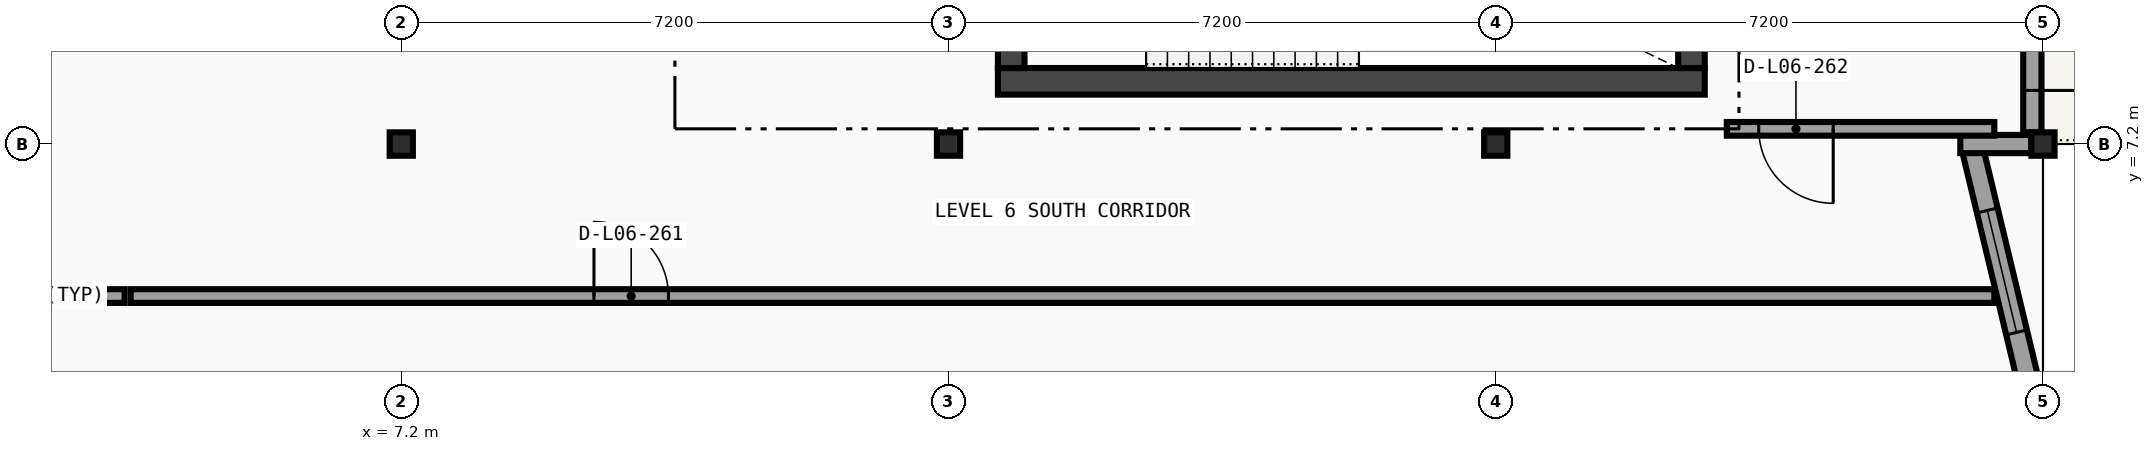
"""IFC4 building model, lengths in metres.
Left out: names, types, materials, properties, quantities, classifications, styles, units other than length and angle.
Written with IfcOpenShell. Run it as: python <this file> out.ifc"""

import sys

from ifc_helpers import new_model, si_unit, direction, frame, frame_2d, origin, origin_2d, place, context, subcontext, project, spatial, rectangle, i_section, extrude, element, fill, save


model = new_model("IFC4")
c1 = context("Model", 3, precision=1e-05, world=origin(), true_north=direction((0.0, 1.0)))
c2 = subcontext(c1, "Body", "Model", "MODEL_VIEW")
j1 = project(units=[si_unit("LENGTHUNIT", "METRE"), si_unit("PLANEANGLEUNIT", "RADIAN")], contexts=[c1])
p1 = place(None, origin())
s1 = spatial("IfcSite", under=j1, at=p1, CompositionType="ELEMENT")
p2 = place(p1, origin())
s2 = spatial("IfcBuilding", under=s1, at=p2, CompositionType="ELEMENT")
p3 = place(p2, frame((0.0, 0.0, 27.0)))
s3 = spatial("IfcBuildingStorey", under=s2, at=p3, CompositionType="ELEMENT", Elevation=27.0)
for number, where, z_axis, x_axis in (
    (1, (7.2, 7.2, 0.0), (0.0, 0.0, 1.0), (1.0, 0.0, 0.0)),
    (2, (14.4, 7.2, 0.0), (0.0, 0.0, 1.0), (1.0, 0.0, 0.0)),
    (3, (21.6, 7.2, 0.0), (0.0, 0.0, 1.0), (1.0, 0.0, 0.0)),
    (4, (28.8, 7.2, 0.0), (0.0, 0.0, 1.0), (1.0, 0.0, 0.0)),
):
    element("IfcColumn", number, at=place(p3, frame(where, z_axis=z_axis, x_axis=x_axis)), inside=s3, PredefinedType="COLUMN", context=c2, shape_type="SweptSolid", body=[
        extrude(i_section(OverallWidth=0.305, OverallDepth=0.308, WebThickness=0.01, FlangeThickness=0.015, FilletRadius=0.015, at=origin_2d()), origin(), (0.0, 0.0, 1.0), 4.05),
    ])
p4 = place(p3, frame((28.64, 3.94, 0.0), z_axis=(0.0, 0.0, 1.0), x_axis=(-0.233443812137, 0.972370292931, 0.0)))
e5 = element("IfcWall", 5, at=p4, inside=s3, PredefinedType="SOLIDWALL", context=c2, shape_type="SweptSolid", body=[
    extrude(rectangle(XDim=3.258, YDim=0.28, at=frame_2d((1.629, 0.0))), origin(), (0.0, 0.0, 1.0), 3.246),
])
p5 = place(p4, frame((0.804, 0.0, 0.8)))
e6 = element("IfcOpeningElement", 6, at=p5, cuts=e5, PredefinedType="OPENING", context=c2, shape_type="SweptSolid", body=[
    extrude(rectangle(XDim=1.65, YDim=1.9, at=frame_2d((0.825, 0.95))), frame((0.0, 0.15, 0.0), z_axis=(0.0, -1.0, 0.0), x_axis=(1.0, 0.0, 0.0)), (0.0, 0.0, 1.0), 0.3),
])
p6 = place(p3, frame((27.712, 7.2, 0.0), z_axis=(0.0, 0.0, 1.0), x_axis=(1.0, 0.0, 0.0)))
e7 = element("IfcWall", 7, at=p6, inside=s3, PredefinedType="SOLIDWALL", context=c2, shape_type="SweptSolid", body=[
    extrude(rectangle(XDim=0.933, YDim=0.24, at=frame_2d((0.467, 0.0))), origin(), (0.0, 0.0, 1.0), 3.246),
])
p7 = place(p3, frame((28.66, 7.355, 0.0), z_axis=(0.0, 0.0, 1.0), x_axis=(0.0, 1.0, 0.0)))
e8 = element("IfcWall", 8, at=p7, inside=s3, PredefinedType="SOLIDWALL", context=c2, shape_type="SweptSolid", body=[
    extrude(rectangle(XDim=6.89, YDim=0.24, at=frame_2d((3.445, 0.0))), origin(), (0.0, 0.0, 1.0), 3.256),
])
p8 = place(p7, frame((0.55, 0.0, 0.0)))
e9 = element("IfcOpeningElement", 9, at=p8, cuts=e8, PredefinedType="OPENING", context=c2, shape_type="SweptSolid", body=[
    extrude(rectangle(XDim=1.8, YDim=2.15, at=frame_2d((0.9, 1.075))), frame((0.0, 0.13, 0.0), z_axis=(0.0, -1.0, 0.0), x_axis=(1.0, 0.0, 0.0)), (0.0, 0.0, 1.0), 0.26),
])
p9 = place(p7, frame((5.04, 0.0, 0.85)))
e10 = element("IfcOpeningElement", 10, at=p9, cuts=e8, PredefinedType="OPENING", context=c2, shape_type="SweptSolid", body=[
    extrude(rectangle(XDim=1.35, YDim=1.85, at=frame_2d((0.675, 0.925))), frame((0.0, 0.13, 0.0), z_axis=(0.0, -1.0, 0.0), x_axis=(1.0, 0.0, 0.0)), (0.0, 0.0, 1.0), 0.26),
])
p10 = place(p3, frame((15.05, 8.025, 0.0), z_axis=(0.0, 0.0, 1.0), x_axis=(1.0, 0.0, 0.0)))
e11 = element("IfcWall", 11, at=p10, inside=s3, PredefinedType="SHEAR", context=c2, shape_type="SweptSolid", body=[
    extrude(rectangle(XDim=9.3, YDim=0.35, at=frame_2d((4.65, 0.0))), origin(), (0.0, 0.0, 1.0), 3.8),
])
p11 = place(p3, frame((15.225, 11.6, 0.0), z_axis=(0.0, 0.0, 1.0), x_axis=(0.0, -1.0, 0.0)))
e12 = element("IfcWall", 12, at=p11, inside=s3, PredefinedType="SHEAR", context=c2, shape_type="SweptSolid", body=[
    extrude(rectangle(XDim=3.4, YDim=0.35, at=frame_2d((1.7, 0.0))), origin(), (0.0, 0.0, 1.0), 3.8),
])
p12 = place(p11, frame((1.125, 0.0, 0.0)))
e13 = element("IfcOpeningElement", 13, at=p12, cuts=e12, PredefinedType="OPENING", context=c2, shape_type="SweptSolid", body=[
    extrude(rectangle(XDim=1.15, YDim=2.1, at=frame_2d((0.575, 1.05))), frame((0.0, 0.185, 0.0), z_axis=(0.0, -1.0, 0.0), x_axis=(1.0, 0.0, 0.0)), (0.0, 0.0, 1.0), 0.37),
])
p13 = place(p3, frame((24.175, 8.2, 0.0), z_axis=(0.0, 0.0, 1.0), x_axis=(0.0, 1.0, 0.0)))
e14 = element("IfcWall", 14, at=p13, inside=s3, PredefinedType="SHEAR", context=c2, shape_type="SweptSolid", body=[
    extrude(rectangle(XDim=3.4, YDim=0.35, at=frame_2d((1.7, 0.0))), origin(), (0.0, 0.0, 1.0), 3.8),
])
p14 = place(p3, frame((1.64, 5.2, 0.0), z_axis=(0.0, 0.0, 1.0), x_axis=(1.0, 0.0, 0.0)))
e15 = element("IfcWall", 15, at=p14, inside=s3, PredefinedType="PARTITIONING", context=c2, shape_type="SweptSolid", body=[
    extrude(rectangle(XDim=1.92, YDim=0.18, at=frame_2d((0.96, 0.0))), origin(), (0.0, 0.0, 1.0), 3.8),
])
p15 = place(p3, frame((3.64, 5.2, 0.0), z_axis=(0.0, 0.0, 1.0), x_axis=(1.0, 0.0, 0.0)))
e16 = element("IfcWall", 16, at=p15, inside=s3, PredefinedType="PARTITIONING", context=c2, shape_type="SweptSolid", body=[
    extrude(rectangle(XDim=24.52, YDim=0.18, at=frame_2d((12.26, 0.0))), origin(), (0.0, 0.0, 1.0), 3.246),
])
p16 = place(p15, frame((6.095, 0.0, 0.0)))
e17 = element("IfcOpeningElement", 17, at=p16, cuts=e16, PredefinedType="OPENING", context=c2, shape_type="SweptSolid", body=[
    extrude(rectangle(XDim=0.98, YDim=2.1, at=frame_2d((0.49, 1.05))), frame((0.0, 0.1, 0.0), z_axis=(0.0, -1.0, 0.0), x_axis=(1.0, 0.0, 0.0)), (0.0, 0.0, 1.0), 0.2),
])
p17 = place(p3, frame((24.64, 7.4, 0.0), z_axis=(0.0, 0.0, 1.0), x_axis=(1.0, 0.0, 0.0)))
e18 = element("IfcWall", 18, at=p17, inside=s3, PredefinedType="PARTITIONING", context=c2, shape_type="SweptSolid", body=[
    extrude(rectangle(XDim=3.52, YDim=0.18, at=frame_2d((1.76, 0.0))), origin(), (0.0, 0.0, 1.0), 3.246),
])
p18 = place(p17, frame((0.42, 0.0, 0.0)))
e19 = element("IfcOpeningElement", 19, at=p18, cuts=e18, PredefinedType="OPENING", context=c2, shape_type="SweptSolid", body=[
    extrude(rectangle(XDim=0.98, YDim=2.1, at=frame_2d((0.49, 1.05))), frame((0.0, 0.1, 0.0), z_axis=(0.0, -1.0, 0.0), x_axis=(1.0, 0.0, 0.0)), (0.0, 0.0, 1.0), 0.2),
])
p19 = place(p5, origin())
e20 = element("IfcWindow", 20, at=p19, inside=s3, PartitioningType="SINGLE_PANEL", PredefinedType="WINDOW", context=c2, shape_type="SweptSolid", body=[
    extrude(rectangle(XDim=1.65, YDim=1.9, at=frame_2d((0.825, 0.95))), frame((0.0, 0.03, 0.0), z_axis=(0.0, -1.0, 0.0), x_axis=(1.0, 0.0, 0.0)), (0.0, 0.0, 1.0), 0.06),
])
fill(e6, e20)
p20 = place(p8, frame((1.8, 0.0, 0.0), z_axis=(0.0, 0.0, 1.0), x_axis=(-1.0, 0.0, 0.0)))
e21 = element("IfcDoor", 21, at=p20, inside=s3, OperationType="DOUBLE_DOOR_SINGLE_SWING", PredefinedType="DOOR", context=c2, shape_type="SweptSolid", body=[
    extrude(rectangle(XDim=1.8, YDim=2.15, at=frame_2d((0.9, 1.075))), frame((0.0, 0.025, 0.0), z_axis=(0.0, -1.0, 0.0), x_axis=(1.0, 0.0, 0.0)), (0.0, 0.0, 1.0), 0.05),
])
fill(e9, e21)
p21 = place(p16, origin())
e22 = element("IfcDoor", 22, at=p21, inside=s3, OperationType="SINGLE_SWING_LEFT", PredefinedType="DOOR", context=c2, shape_type="SweptSolid", body=[
    extrude(rectangle(XDim=0.98, YDim=2.1, at=frame_2d((0.49, 1.05))), frame((0.0, 0.025, 0.0), z_axis=(0.0, -1.0, 0.0), x_axis=(1.0, 0.0, 0.0)), (0.0, 0.0, 1.0), 0.05),
])
fill(e17, e22)
p22 = place(p18, origin())
e23 = element("IfcDoor", 23, at=p22, inside=s3, OperationType="SINGLE_SWING_RIGHT", PredefinedType="DOOR", context=c2, shape_type="SweptSolid", body=[
    extrude(rectangle(XDim=0.98, YDim=2.1, at=frame_2d((0.49, 1.05))), frame((0.0, 0.025, 0.0), z_axis=(0.0, -1.0, 0.0), x_axis=(1.0, 0.0, 0.0)), (0.0, 0.0, 1.0), 0.05),
])
fill(e19, e23)
save(model, sys.argv[1])
